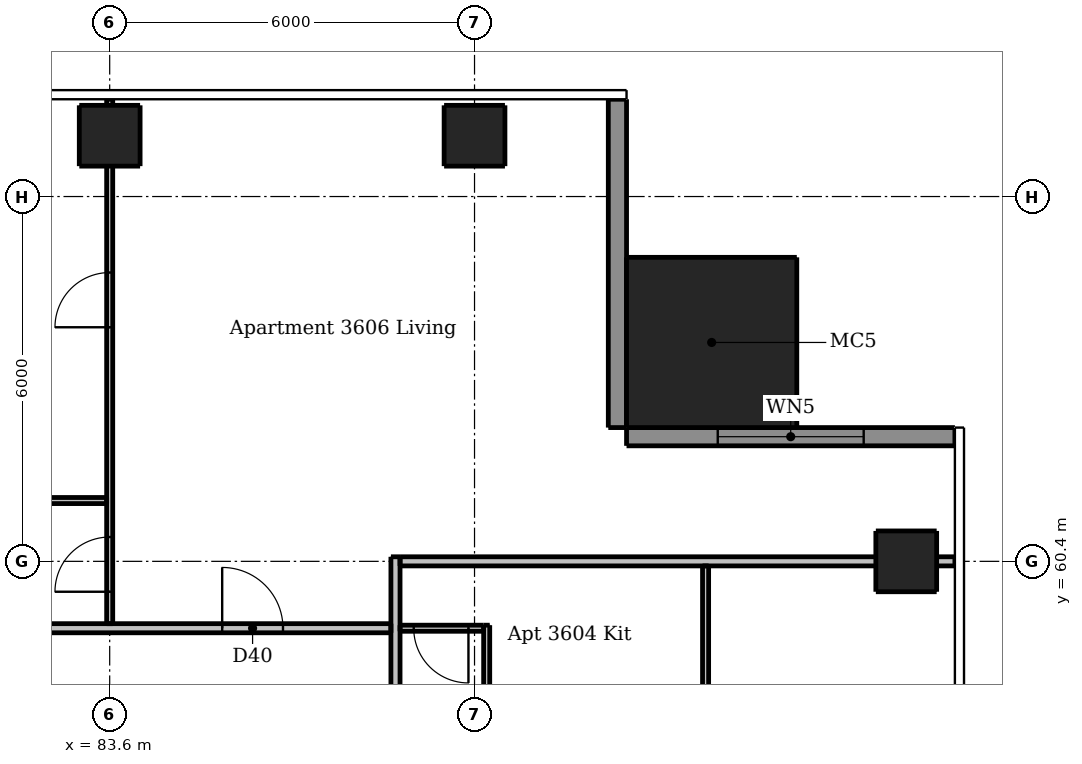
"""IFC4 building model, lengths in metres.
Left out: names, types, materials, properties, quantities, classifications, styles, units other than length and angle.
Written with IfcOpenShell. Run it as: python <this file> out.ifc"""

import sys

from ifc_helpers import new_model, si_unit, direction, frame, frame_2d, origin, origin_2d, place, context, subcontext, project, spatial, rectangle, extrude, element, fill, save


model = new_model("IFC4")
c1 = context("Model", 3, precision=1e-05, world=origin(), true_north=direction((0.0, 1.0)))
c2 = subcontext(c1, "Body", "Model", "MODEL_VIEW")
j1 = project(units=[si_unit("LENGTHUNIT", "METRE"), si_unit("PLANEANGLEUNIT", "RADIAN")], contexts=[c1])
p1 = place(None, origin())
s1 = spatial("IfcSite", under=j1, at=p1, CompositionType="ELEMENT")
p2 = place(p1, origin())
s2 = spatial("IfcBuilding", under=s1, at=p2, CompositionType="ELEMENT")
p3 = place(p2, frame((0.0, 0.0, 137.2)))
s3 = spatial("IfcBuildingStorey", under=s2, at=p3, CompositionType="ELEMENT", Elevation=137.2)
for number, where, z_axis, x_axis in (
    (1, (96.7, 60.4, 0.0), (0.0, 0.0, 1.0), (1.0, 0.0, 0.0)),
    (2, (83.6, 67.4, 0.0), (0.0, 0.0, 1.0), (1.0, 0.0, 0.0)),
    (3, (89.6, 67.4, 0.0), (0.0, 0.0, 1.0), (1.0, 0.0, 0.0)),
):
    element("IfcColumn", number, at=place(p3, frame(where, z_axis=z_axis, x_axis=x_axis)), inside=s3, PredefinedType="COLUMN", context=c2, shape_type="SweptSolid", body=[
        extrude(rectangle(XDim=1.0, YDim=1.0, at=origin_2d()), origin(), (0.0, 0.0, 1.0), 3.05),
    ])
p4 = place(p3, frame((93.5, 64.0, 0.0), z_axis=(0.0, 0.0, 1.0), x_axis=(1.0, 0.0, 0.0)))
e4 = element("IfcColumn", 4, at=p4, inside=s3, PredefinedType="COLUMN", context=c2, shape_type="SweptSolid", body=[
    extrude(rectangle(XDim=2.8, YDim=2.8, at=origin_2d()), origin(), (0.0, 0.0, 1.0), 3.3),
])
p5 = place(p3, frame((97.5, 62.45, 0.0), z_axis=(0.0, 0.0, 1.0), x_axis=(-1.0, 0.0, 0.0)))
e5 = element("IfcWall", 5, at=p5, inside=s3, PredefinedType="SOLIDWALL", context=c2, shape_type="SweptSolid", body=[
    extrude(rectangle(XDim=5.4, YDim=0.3, at=frame_2d((2.7, 0.0))), origin(), (0.0, 0.0, 1.0), 3.05),
])
p6 = place(p5, frame((1.5, 0.0, 0.15)))
e6 = element("IfcOpeningElement", 6, at=p6, cuts=e5, PredefinedType="OPENING", context=c2, shape_type="SweptSolid", body=[
    extrude(rectangle(XDim=2.4, YDim=2.1, at=frame_2d((1.2, 1.05))), frame((0.0, 0.16, 0.0), z_axis=(0.0, -1.0, 0.0), x_axis=(1.0, 0.0, 0.0)), (0.0, 0.0, 1.0), 0.32),
])
p7 = place(p3, frame((91.95, 62.6, 0.0), z_axis=(0.0, 0.0, 1.0), x_axis=(0.0, 1.0, 0.0)))
e7 = element("IfcWall", 7, at=p7, inside=s3, PredefinedType="SOLIDWALL", context=c2, shape_type="SweptSolid", body=[
    extrude(rectangle(XDim=5.4, YDim=0.3, at=frame_2d((2.7, 0.0))), origin(), (0.0, 0.0, 1.0), 3.05),
])
p8 = place(p3, frame((83.6, 59.375, 0.0), z_axis=(0.0, 0.0, 1.0), x_axis=(0.0, 1.0, 0.0)))
e8 = element("IfcWall", 8, at=p8, inside=s3, PredefinedType="PARTITIONING", context=c2, shape_type="SweptSolid", body=[
    extrude(rectangle(XDim=8.625, YDim=0.1, at=frame_2d((4.312, 0.0))), origin(), (0.0, 0.0, 1.0), 2.516),
])
p9 = place(p8, frame((0.525, 0.0, 0.0)))
e9 = element("IfcOpeningElement", 9, at=p9, cuts=e8, PredefinedType="OPENING", context=c2, shape_type="SweptSolid", body=[
    extrude(rectangle(XDim=0.9, YDim=2.1, at=frame_2d((0.45, 1.05))), frame((0.0, 0.06, 0.0), z_axis=(0.0, -1.0, 0.0), x_axis=(1.0, 0.0, 0.0)), (0.0, 0.0, 1.0), 0.12),
])
p10 = place(p8, frame((4.875, 0.0, 0.0)))
e10 = element("IfcOpeningElement", 10, at=p10, cuts=e8, PredefinedType="OPENING", context=c2, shape_type="SweptSolid", body=[
    extrude(rectangle(XDim=0.9, YDim=2.1, at=frame_2d((0.45, 1.05))), frame((0.0, 0.06, 0.0), z_axis=(0.0, -1.0, 0.0), x_axis=(1.0, 0.0, 0.0)), (0.0, 0.0, 1.0), 0.12),
])
p11 = place(p3, frame((89.8, 59.35, 0.0), z_axis=(0.0, 0.0, 1.0), x_axis=(0.0, -1.0, 0.0)))
e11 = element("IfcWall", 11, at=p11, inside=s3, PredefinedType="PARTITIONING", context=c2, shape_type="SweptSolid", body=[
    extrude(rectangle(XDim=19.775, YDim=0.1, at=frame_2d((9.888, 0.0))), origin(), (0.0, 0.0, 1.0), 3.05),
])
p12 = place(p11, frame((2.7, 0.0, 0.0)))
e12 = element("IfcOpeningElement", 12, at=p12, cuts=e11, PredefinedType="OPENING", context=c2, shape_type="SweptSolid", body=[
    extrude(rectangle(XDim=0.9, YDim=2.1, at=frame_2d((0.45, 1.05))), frame((0.0, 0.06, 0.0), z_axis=(0.0, -1.0, 0.0), x_axis=(1.0, 0.0, 0.0)), (0.0, 0.0, 1.0), 0.12),
])
p13 = place(p11, frame((17.6, 0.0, 0.0)))
e13 = element("IfcOpeningElement", 13, at=p13, cuts=e11, PredefinedType="OPENING", context=c2, shape_type="SweptSolid", body=[
    extrude(rectangle(XDim=0.9, YDim=2.1, at=frame_2d((0.45, 1.05))), frame((0.0, 0.06, 0.0), z_axis=(0.0, -1.0, 0.0), x_axis=(1.0, 0.0, 0.0)), (0.0, 0.0, 1.0), 0.12),
])
p14 = place(p11, frame((10.15, 0.0, 0.0)))
e14 = element("IfcOpeningElement", 14, at=p14, cuts=e11, PredefinedType="OPENING", context=c2, shape_type="SweptSolid", body=[
    extrude(rectangle(XDim=0.9, YDim=2.1, at=frame_2d((0.45, 1.05))), frame((0.0, 0.06, 0.0), z_axis=(0.0, -1.0, 0.0), x_axis=(1.0, 0.0, 0.0)), (0.0, 0.0, 1.0), 0.12),
])
p15 = place(p11, frame((14.65, 0.0, 0.0)))
e15 = element("IfcOpeningElement", 15, at=p15, cuts=e11, PredefinedType="OPENING", context=c2, shape_type="SweptSolid", body=[
    extrude(rectangle(XDim=0.8, YDim=2.1, at=frame_2d((0.4, 1.05))), frame((0.0, 0.06, 0.0), z_axis=(0.0, -1.0, 0.0), x_axis=(1.0, 0.0, 0.0)), (0.0, 0.0, 1.0), 0.12),
])
p16 = place(p11, frame((5.75, 0.0, 0.0)))
e16 = element("IfcOpeningElement", 16, at=p16, cuts=e11, PredefinedType="OPENING", context=c2, shape_type="SweptSolid", body=[
    extrude(rectangle(XDim=0.8, YDim=2.1, at=frame_2d((0.4, 1.05))), frame((0.0, 0.06, 0.0), z_axis=(0.0, -1.0, 0.0), x_axis=(1.0, 0.0, 0.0)), (0.0, 0.0, 1.0), 0.12),
])
p17 = place(p3, frame((93.4, 57.95, 0.0), z_axis=(0.0, 0.0, 1.0), x_axis=(0.0, 1.0, 0.0)))
e17 = element("IfcWall", 17, at=p17, inside=s3, PredefinedType="PARTITIONING", context=c2, shape_type="SweptSolid", body=[
    extrude(rectangle(XDim=2.375, YDim=0.1, at=frame_2d((1.188, 0.0))), origin(), (0.0, 0.0, 1.0), 3.05),
])
p18 = place(p3, frame((83.55, 61.4, 0.0), z_axis=(0.0, 0.0, 1.0), x_axis=(-1.0, 0.0, 0.0)))
e18 = element("IfcWall", 18, at=p18, inside=s3, PredefinedType="PARTITIONING", context=c2, shape_type="SweptSolid", body=[
    extrude(rectangle(XDim=5.875, YDim=0.1, at=frame_2d((2.938, 0.0))), origin(), (0.0, 0.0, 1.0), 3.05),
])
p19 = place(p18, frame((3.75, 0.0, 0.0)))
e19 = element("IfcOpeningElement", 19, at=p19, cuts=e18, PredefinedType="OPENING", context=c2, shape_type="SweptSolid", body=[
    extrude(rectangle(XDim=0.8, YDim=2.1, at=frame_2d((0.4, 1.05))), frame((0.0, 0.06, 0.0), z_axis=(0.0, -1.0, 0.0), x_axis=(1.0, 0.0, 0.0)), (0.0, 0.0, 1.0), 0.12),
])
p20 = place(p3, frame((89.75, 59.3, 0.0), z_axis=(0.0, 0.0, 1.0), x_axis=(-1.0, 0.0, 0.0)))
e20 = element("IfcWall", 20, at=p20, inside=s3, PredefinedType="PARTITIONING", context=c2, shape_type="SweptSolid", body=[
    extrude(rectangle(XDim=1.375, YDim=0.1, at=frame_2d((0.688, 0.0))), origin(), (0.0, 0.0, 1.0), 3.05),
])
p21 = place(p20, frame((0.25, 0.0, 0.0)))
e21 = element("IfcOpeningElement", 21, at=p21, cuts=e20, PredefinedType="OPENING", context=c2, shape_type="SweptSolid", body=[
    extrude(rectangle(XDim=0.9, YDim=2.1, at=frame_2d((0.45, 1.05))), frame((0.0, 0.06, 0.0), z_axis=(0.0, -1.0, 0.0), x_axis=(1.0, 0.0, 0.0)), (0.0, 0.0, 1.0), 0.12),
])
p22 = place(p3, frame((88.3, 60.475, 0.0), z_axis=(0.0, 0.0, 1.0), x_axis=(0.0, -1.0, 0.0)))
e22 = element("IfcWall", 22, at=p22, inside=s3, PredefinedType="PARTITIONING", context=c2, shape_type="SweptSolid", body=[
    extrude(rectangle(XDim=28.7, YDim=0.15, at=frame_2d((14.35, 0.0))), origin(), (0.0, 0.0, 1.0), 3.05),
])
p23 = place(p22, frame((27.425, 0.0, 0.0)))
e23 = element("IfcOpeningElement", 23, at=p23, cuts=e22, PredefinedType="OPENING", context=c2, shape_type="SweptSolid", body=[
    extrude(rectangle(XDim=1.0, YDim=2.1, at=frame_2d((0.5, 1.05))), frame((0.0, 0.085, 0.0), z_axis=(0.0, -1.0, 0.0), x_axis=(1.0, 0.0, 0.0)), (0.0, 0.0, 1.0), 0.17),
])
p24 = place(p22, frame((10.575, 0.0, 0.0)))
e24 = element("IfcOpeningElement", 24, at=p24, cuts=e22, PredefinedType="OPENING", context=c2, shape_type="SweptSolid", body=[
    extrude(rectangle(XDim=1.0, YDim=2.1, at=frame_2d((0.5, 1.05))), frame((0.0, 0.085, 0.0), z_axis=(0.0, -1.0, 0.0), x_axis=(1.0, 0.0, 0.0)), (0.0, 0.0, 1.0), 0.17),
])
p25 = place(p3, frame((88.375, 60.4, 0.0), z_axis=(0.0, 0.0, 1.0), x_axis=(1.0, 0.0, 0.0)))
e25 = element("IfcWall", 25, at=p25, inside=s3, PredefinedType="PARTITIONING", context=c2, shape_type="SweptSolid", body=[
    extrude(rectangle(XDim=9.125, YDim=0.15, at=frame_2d((4.562, 0.0))), origin(), (0.0, 0.0, 1.0), 2.647),
])
p26 = place(p3, frame((59.675, 59.3, 0.0), z_axis=(0.0, 0.0, 1.0), x_axis=(1.0, 0.0, 0.0)))
e26 = element("IfcWall", 26, at=p26, inside=s3, PredefinedType="PARTITIONING", context=c2, shape_type="SweptSolid", body=[
    extrude(rectangle(XDim=28.55, YDim=0.15, at=frame_2d((14.275, 0.0))), origin(), (0.0, 0.0, 1.0), 3.05),
])
p27 = place(p26, frame((8.975, 0.0, 0.0)))
e27 = element("IfcOpeningElement", 27, at=p27, cuts=e26, PredefinedType="OPENING", context=c2, shape_type="SweptSolid", body=[
    extrude(rectangle(XDim=1.0, YDim=2.1, at=frame_2d((0.5, 1.05))), frame((0.0, 0.085, 0.0), z_axis=(0.0, -1.0, 0.0), x_axis=(1.0, 0.0, 0.0)), (0.0, 0.0, 1.0), 0.17),
])
p28 = place(p26, frame((25.775, 0.0, 0.0)))
e28 = element("IfcOpeningElement", 28, at=p28, cuts=e26, PredefinedType="OPENING", context=c2, shape_type="SweptSolid", body=[
    extrude(rectangle(XDim=1.0, YDim=2.1, at=frame_2d((0.5, 1.05))), frame((0.0, 0.085, 0.0), z_axis=(0.0, -1.0, 0.0), x_axis=(1.0, 0.0, 0.0)), (0.0, 0.0, 1.0), 0.17),
])
p29 = place(p6, origin())
e29 = element("IfcWindow", 29, at=p29, inside=s3, PartitioningType="DOUBLE_PANEL_VERTICAL", PredefinedType="WINDOW", context=c2, shape_type="SweptSolid", body=[
    extrude(rectangle(XDim=2.4, YDim=2.1, at=frame_2d((1.2, 1.05))), frame((0.0, 0.03, 0.0), z_axis=(0.0, -1.0, 0.0), x_axis=(1.0, 0.0, 0.0)), (0.0, 0.0, 1.0), 0.06),
])
fill(e6, e29)
p30 = place(p21, origin())
e30 = element("IfcDoor", 30, at=p30, inside=s3, OperationType="SINGLE_SWING_LEFT", PredefinedType="DOOR", context=c2, shape_type="SweptSolid", body=[
    extrude(rectangle(XDim=0.9, YDim=2.1, at=frame_2d((0.45, 1.05))), frame((0.0, 0.025, 0.0), z_axis=(0.0, -1.0, 0.0), x_axis=(1.0, 0.0, 0.0)), (0.0, 0.0, 1.0), 0.05),
])
fill(e21, e30)
p31 = place(p28, origin())
e31 = element("IfcDoor", 31, at=p31, inside=s3, OperationType="SINGLE_SWING_LEFT", PredefinedType="DOOR", context=c2, shape_type="SweptSolid", body=[
    extrude(rectangle(XDim=1.0, YDim=2.1, at=frame_2d((0.5, 1.05))), frame((0.0, 0.025, 0.0), z_axis=(0.0, -1.0, 0.0), x_axis=(1.0, 0.0, 0.0)), (0.0, 0.0, 1.0), 0.05),
])
fill(e28, e31)
p32 = place(p9, origin())
e32 = element("IfcDoor", 32, at=p32, inside=s3, OperationType="SINGLE_SWING_LEFT", PredefinedType="DOOR", context=c2, shape_type="SweptSolid", body=[
    extrude(rectangle(XDim=0.9, YDim=2.1, at=frame_2d((0.45, 1.05))), frame((0.0, 0.025, 0.0), z_axis=(0.0, -1.0, 0.0), x_axis=(1.0, 0.0, 0.0)), (0.0, 0.0, 1.0), 0.05),
])
fill(e9, e32)
p33 = place(p10, origin())
e33 = element("IfcDoor", 33, at=p33, inside=s3, OperationType="SINGLE_SWING_LEFT", PredefinedType="DOOR", context=c2, shape_type="SweptSolid", body=[
    extrude(rectangle(XDim=0.9, YDim=2.1, at=frame_2d((0.45, 1.05))), frame((0.0, 0.025, 0.0), z_axis=(0.0, -1.0, 0.0), x_axis=(1.0, 0.0, 0.0)), (0.0, 0.0, 1.0), 0.05),
])
fill(e10, e33)
save(model, sys.argv[1])
